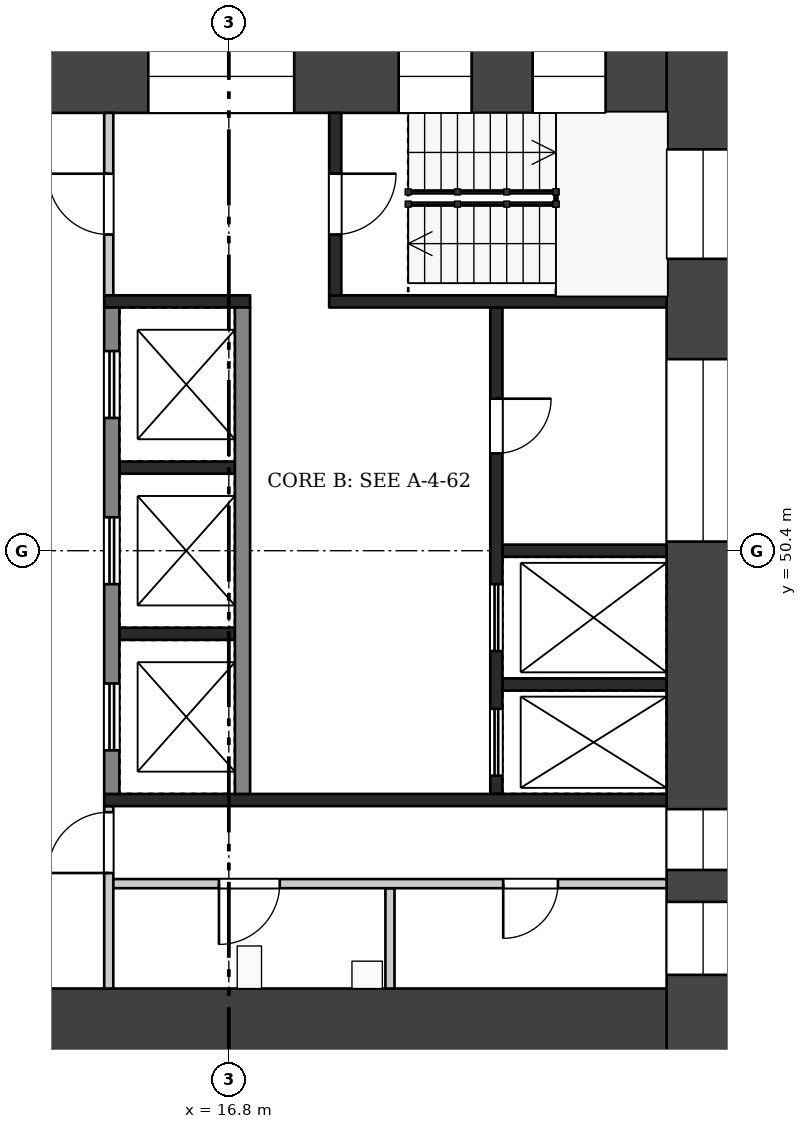
"""IFC4 building model, lengths in metres.
Left out: names, types, materials, properties, quantities, classifications, styles, units other than length and angle.
Written with IfcOpenShell. Run it as: python <this file> out.ifc"""

import sys

from ifc_helpers import new_model, si_unit, direction, frame, frame_2d, origin, place, context, subcontext, project, spatial, rectangle, extrude, element, fill, save


model = new_model("IFC4")
c1 = context("Model", 3, precision=1e-05, world=origin(), true_north=direction((0.0, 1.0)))
c2 = subcontext(c1, "Body", "Model", "MODEL_VIEW")
j1 = project(units=[si_unit("LENGTHUNIT", "METRE"), si_unit("PLANEANGLEUNIT", "RADIAN")], contexts=[c1])
p1 = place(None, origin())
s1 = spatial("IfcSite", under=j1, at=p1, CompositionType="ELEMENT")
p2 = place(p1, origin())
s2 = spatial("IfcBuilding", under=s1, at=p2, CompositionType="ELEMENT")
p3 = place(p2, frame((0.0, 0.0, 179.2)))
s3 = spatial("IfcBuildingStorey", under=s2, at=p3, CompositionType="ELEMENT", Elevation=179.2)
p4 = place(p3, frame((24.6, 58.8, 0.0), z_axis=(0.0, 0.0, 1.0), x_axis=(0.0, -1.0, 0.0)))
e1 = element("IfcWall", 1, at=p4, inside=s3, PredefinedType="SHEAR", context=c2, shape_type="SweptSolid", body=[
    extrude(rectangle(XDim=16.8, YDim=1.2, at=frame_2d((8.4, 0.0))), origin(), (0.0, 0.0, 1.0), 3.22),
])
p5 = place(p4, frame((1.8, 0.0, 0.5)))
e2 = element("IfcOpeningElement", 2, at=p5, cuts=e1, PredefinedType="OPENING", context=c2, shape_type="SweptSolid", body=[
    extrude(rectangle(XDim=1.8, YDim=2.4, at=frame_2d((0.9, 1.2))), frame((0.0, 0.61, 0.0), z_axis=(0.0, -1.0, 0.0), x_axis=(1.0, 0.0, 0.0)), (0.0, 0.0, 1.0), 1.22),
])
p6 = place(p4, frame((5.25, 0.0, 1.6)))
e3 = element("IfcOpeningElement", 3, at=p6, cuts=e1, PredefinedType="OPENING", context=c2, shape_type="SweptSolid", body=[
    extrude(rectangle(XDim=3.0, YDim=1.2, at=frame_2d((1.5, 0.6))), frame((0.0, 0.61, 0.0), z_axis=(0.0, -1.0, 0.0), x_axis=(1.0, 0.0, 0.0)), (0.0, 0.0, 1.0), 1.22),
])
p7 = place(p4, frame((12.65, 0.0, 0.6)))
e4 = element("IfcOpeningElement", 4, at=p7, cuts=e1, PredefinedType="OPENING", context=c2, shape_type="SweptSolid", body=[
    extrude(rectangle(XDim=1.0, YDim=2.1, at=frame_2d((0.5, 1.05))), frame((0.0, 0.61, 0.0), z_axis=(0.0, -1.0, 0.0), x_axis=(1.0, 0.0, 0.0)), (0.0, 0.0, 1.0), 1.22),
])
p8 = place(p4, frame((14.175, 0.0, 1.6)))
e5 = element("IfcOpeningElement", 5, at=p8, cuts=e1, PredefinedType="OPENING", context=c2, shape_type="SweptSolid", body=[
    extrude(rectangle(XDim=1.2, YDim=1.2, at=frame_2d((0.6, 0.6))), frame((0.0, 0.61, 0.0), z_axis=(0.0, -1.0, 0.0), x_axis=(1.0, 0.0, 0.0)), (0.0, 0.0, 1.0), 1.22),
])
p9 = place(p3, frame((9.6, 58.2, 0.0), z_axis=(0.0, 0.0, 1.0), x_axis=(1.0, 0.0, 0.0)))
e6 = element("IfcWall", 6, at=p9, inside=s3, PredefinedType="SHEAR", context=c2, shape_type="SweptSolid", body=[
    extrude(rectangle(XDim=14.4, YDim=1.2, at=frame_2d((7.2, 0.0))), origin(), (0.0, 0.0, 1.0), 3.22),
])
p10 = place(p9, frame((1.105, 0.0, 0.6)))
e7 = element("IfcOpeningElement", 7, at=p10, cuts=e6, PredefinedType="OPENING", context=c2, shape_type="SweptSolid", body=[
    extrude(rectangle(XDim=3.0, YDim=2.1, at=frame_2d((1.5, 1.05))), frame((0.0, 0.61, 0.0), z_axis=(0.0, -1.0, 0.0), x_axis=(1.0, 0.0, 0.0)), (0.0, 0.0, 1.0), 1.22),
])
p11 = place(p9, frame((5.875, 0.0, 0.6)))
e8 = element("IfcOpeningElement", 8, at=p11, cuts=e6, PredefinedType="OPENING", context=c2, shape_type="SweptSolid", body=[
    extrude(rectangle(XDim=2.4, YDim=2.1, at=frame_2d((1.2, 1.05))), frame((0.0, 0.61, 0.0), z_axis=(0.0, -1.0, 0.0), x_axis=(1.0, 0.0, 0.0)), (0.0, 0.0, 1.0), 1.22),
])
p12 = place(p9, frame((9.993, 0.0, 0.5)))
e9 = element("IfcOpeningElement", 9, at=p12, cuts=e6, PredefinedType="OPENING", context=c2, shape_type="SweptSolid", body=[
    extrude(rectangle(XDim=1.2, YDim=2.4, at=frame_2d((0.6, 1.2))), frame((0.0, 0.61, 0.0), z_axis=(0.0, -1.0, 0.0), x_axis=(1.0, 0.0, 0.0)), (0.0, 0.0, 1.0), 1.22),
])
p13 = place(p9, frame((12.197, 0.0, 0.5)))
e10 = element("IfcOpeningElement", 10, at=p13, cuts=e6, PredefinedType="OPENING", context=c2, shape_type="SweptSolid", body=[
    extrude(rectangle(XDim=1.2, YDim=2.4, at=frame_2d((0.6, 1.2))), frame((0.0, 0.61, 0.0), z_axis=(0.0, -1.0, 0.0), x_axis=(1.0, 0.0, 0.0)), (0.0, 0.0, 1.0), 1.22),
])
p14 = place(p3, frame((9.6, 42.6, 0.0), z_axis=(0.0, 0.0, 1.0), x_axis=(1.0, 0.0, 0.0)))
e11 = element("IfcWall", 11, at=p14, inside=s3, PredefinedType="SHEAR", context=c2, shape_type="SweptSolid", body=[
    extrude(rectangle(XDim=14.4, YDim=1.2, at=frame_2d((7.2, 0.0))), origin(), (0.0, 0.0, 1.0), 3.22),
])
p15 = place(p14, frame((2.1, 0.0, 0.0)))
e12 = element("IfcOpeningElement", 12, at=p15, cuts=e11, PredefinedType="OPENING", context=c2, shape_type="SweptSolid", body=[
    extrude(rectangle(XDim=1.8, YDim=2.1, at=frame_2d((0.9, 1.05))), frame((0.0, 0.61, 0.0), z_axis=(0.0, -1.0, 0.0), x_axis=(1.0, 0.0, 0.0)), (0.0, 0.0, 1.0), 1.22),
])
for number, where, z_axis, x_axis in (
    (13, (15.0, 51.767, 0.0), (0.0, 0.0, 1.0), (1.0, 0.0, 0.0)),
    (14, (15.0, 49.033, 0.0), (0.0, 0.0, 1.0), (1.0, 0.0, 0.0)),
):
    element("IfcWall", number, at=place(p3, frame(where, z_axis=z_axis, x_axis=x_axis)), inside=s3, PredefinedType="SHEAR", context=c2, shape_type="SweptSolid", body=[
        extrude(rectangle(XDim=1.9, YDim=0.2, at=frame_2d((0.95, 0.0))), origin(), (0.0, 0.0, 1.0), 3.22),
    ])
p16 = place(p3, frame((14.875, 54.4, 0.0), z_axis=(0.0, 0.0, 1.0), x_axis=(0.0, -1.0, 0.0)))
e15 = element("IfcWall", 15, at=p16, inside=s3, PredefinedType="SHEAR", context=c2, shape_type="SweptSolid", body=[
    extrude(rectangle(XDim=8.0, YDim=0.25, at=frame_2d((4.0, 0.0))), origin(), (0.0, 0.0, 1.0), 3.22),
])
p17 = place(p16, frame((0.717, 0.0, 0.0)))
e16 = element("IfcOpeningElement", 16, at=p17, cuts=e15, PredefinedType="OPENING", context=c2, shape_type="SweptSolid", body=[
    extrude(rectangle(XDim=1.1, YDim=2.1, at=frame_2d((0.55, 1.05))), frame((0.0, 0.135, 0.0), z_axis=(0.0, -1.0, 0.0), x_axis=(1.0, 0.0, 0.0)), (0.0, 0.0, 1.0), 0.27),
])
p18 = place(p16, frame((3.45, 0.0, 0.0)))
e17 = element("IfcOpeningElement", 17, at=p18, cuts=e15, PredefinedType="OPENING", context=c2, shape_type="SweptSolid", body=[
    extrude(rectangle(XDim=1.1, YDim=2.1, at=frame_2d((0.55, 1.05))), frame((0.0, 0.135, 0.0), z_axis=(0.0, -1.0, 0.0), x_axis=(1.0, 0.0, 0.0)), (0.0, 0.0, 1.0), 0.27),
])
p19 = place(p16, frame((6.183, 0.0, 0.0)))
e18 = element("IfcOpeningElement", 18, at=p19, cuts=e15, PredefinedType="OPENING", context=c2, shape_type="SweptSolid", body=[
    extrude(rectangle(XDim=1.1, YDim=2.1, at=frame_2d((0.55, 1.05))), frame((0.0, 0.135, 0.0), z_axis=(0.0, -1.0, 0.0), x_axis=(1.0, 0.0, 0.0)), (0.0, 0.0, 1.0), 0.27),
])
p20 = place(p3, frame((17.025, 54.4, 0.0), z_axis=(0.0, 0.0, 1.0), x_axis=(0.0, -1.0, 0.0)))
e19 = element("IfcWall", 19, at=p20, inside=s3, PredefinedType="SHEAR", context=c2, shape_type="SweptSolid", body=[
    extrude(rectangle(XDim=8.0, YDim=0.25, at=frame_2d((4.0, 0.0))), origin(), (0.0, 0.0, 1.0), 3.22),
])
for number, where, z_axis, x_axis in (
    (20, (21.3, 50.4, 0.0), (0.0, 0.0, 1.0), (1.0, 0.0, 0.0)),
    (21, (21.3, 48.2, 0.0), (0.0, 0.0, 1.0), (1.0, 0.0, 0.0)),
):
    element("IfcWall", number, at=place(p3, frame(where, z_axis=z_axis, x_axis=x_axis)), inside=s3, PredefinedType="SHEAR", context=c2, shape_type="SweptSolid", body=[
        extrude(rectangle(XDim=2.7, YDim=0.2, at=frame_2d((1.35, 0.0))), origin(), (0.0, 0.0, 1.0), 3.22),
    ])
p21 = place(p3, frame((21.2, 54.4, 0.0), z_axis=(0.0, 0.0, 1.0), x_axis=(0.0, -1.0, 0.0)))
e22 = element("IfcWall", 22, at=p21, inside=s3, PredefinedType="SHEAR", context=c2, shape_type="SweptSolid", body=[
    extrude(rectangle(XDim=8.0, YDim=0.2, at=frame_2d((4.0, 0.0))), origin(), (0.0, 0.0, 1.0), 3.22),
])
p22 = place(p21, frame((1.5, 0.0, 0.0)))
e23 = element("IfcOpeningElement", 23, at=p22, cuts=e22, PredefinedType="OPENING", context=c2, shape_type="SweptSolid", body=[
    extrude(rectangle(XDim=0.9, YDim=2.1, at=frame_2d((0.45, 1.05))), frame((0.0, 0.11, 0.0), z_axis=(0.0, -1.0, 0.0), x_axis=(1.0, 0.0, 0.0)), (0.0, 0.0, 1.0), 0.22),
])
p23 = place(p21, frame((4.55, 0.0, 0.0)))
e24 = element("IfcOpeningElement", 24, at=p23, cuts=e22, PredefinedType="OPENING", context=c2, shape_type="SweptSolid", body=[
    extrude(rectangle(XDim=1.1, YDim=2.1, at=frame_2d((0.55, 1.05))), frame((0.0, 0.11, 0.0), z_axis=(0.0, -1.0, 0.0), x_axis=(1.0, 0.0, 0.0)), (0.0, 0.0, 1.0), 0.22),
])
p24 = place(p21, frame((6.6, 0.0, 0.0)))
e25 = element("IfcOpeningElement", 25, at=p24, cuts=e22, PredefinedType="OPENING", context=c2, shape_type="SweptSolid", body=[
    extrude(rectangle(XDim=1.1, YDim=2.1, at=frame_2d((0.55, 1.05))), frame((0.0, 0.11, 0.0), z_axis=(0.0, -1.0, 0.0), x_axis=(1.0, 0.0, 0.0)), (0.0, 0.0, 1.0), 0.22),
])
p25 = place(p3, frame((14.75, 54.5, 0.0), z_axis=(0.0, 0.0, 1.0), x_axis=(1.0, 0.0, 0.0)))
e26 = element("IfcWall", 26, at=p25, inside=s3, PredefinedType="SHEAR", context=c2, shape_type="SweptSolid", body=[
    extrude(rectangle(XDim=2.4, YDim=0.2, at=frame_2d((1.2, 0.0))), origin(), (0.0, 0.0, 1.0), 3.22),
])
p26 = place(p3, frame((18.45, 54.5, 0.0), z_axis=(0.0, 0.0, 1.0), x_axis=(1.0, 0.0, 0.0)))
e27 = element("IfcWall", 27, at=p26, inside=s3, PredefinedType="SHEAR", context=c2, shape_type="SweptSolid", body=[
    extrude(rectangle(XDim=5.55, YDim=0.2, at=frame_2d((2.775, 0.0))), origin(), (0.0, 0.0, 1.0), 3.22),
])
p27 = place(p3, frame((14.825, 57.6, 0.0), z_axis=(0.0, 0.0, 1.0), x_axis=(0.0, -1.0, 0.0)))
e28 = element("IfcWall", 28, at=p27, inside=s3, PredefinedType="PARTITIONING", context=c2, shape_type="SweptSolid", body=[
    extrude(rectangle(XDim=3.0, YDim=0.15, at=frame_2d((1.5, 0.0))), origin(), (0.0, 0.0, 1.0), 3.22),
])
p28 = place(p27, frame((1.0, 0.0, 0.0)))
e29 = element("IfcOpeningElement", 29, at=p28, cuts=e28, PredefinedType="OPENING", context=c2, shape_type="SweptSolid", body=[
    extrude(rectangle(XDim=1.0, YDim=2.1, at=frame_2d((0.5, 1.05))), frame((0.0, 0.085, 0.0), z_axis=(0.0, -1.0, 0.0), x_axis=(1.0, 0.0, 0.0)), (0.0, 0.0, 1.0), 0.17),
])
p29 = place(p3, frame((18.55, 57.6, 0.0), z_axis=(0.0, 0.0, 1.0), x_axis=(0.0, -1.0, 0.0)))
e30 = element("IfcWall", 30, at=p29, inside=s3, PredefinedType="SHEAR", context=c2, shape_type="SweptSolid", body=[
    extrude(rectangle(XDim=3.0, YDim=0.2, at=frame_2d((1.5, 0.0))), origin(), (0.0, 0.0, 1.0), 3.22),
])
p30 = place(p29, frame((1.0, 0.0, 0.0)))
e31 = element("IfcOpeningElement", 31, at=p30, cuts=e30, PredefinedType="OPENING", context=c2, shape_type="SweptSolid", body=[
    extrude(rectangle(XDim=1.0, YDim=2.1, at=frame_2d((0.5, 1.05))), frame((0.0, 0.11, 0.0), z_axis=(0.0, -1.0, 0.0), x_axis=(1.0, 0.0, 0.0)), (0.0, 0.0, 1.0), 0.22),
])
p31 = place(p3, frame((14.75, 46.3, 0.0), z_axis=(0.0, 0.0, 1.0), x_axis=(1.0, 0.0, 0.0)))
e32 = element("IfcWall", 32, at=p31, inside=s3, PredefinedType="SHEAR", context=c2, shape_type="SweptSolid", body=[
    extrude(rectangle(XDim=9.25, YDim=0.2, at=frame_2d((4.625, 0.0))), origin(), (0.0, 0.0, 1.0), 3.22),
])
p32 = place(p3, frame((14.825, 46.2, 0.0), z_axis=(0.0, 0.0, 1.0), x_axis=(0.0, -1.0, 0.0)))
e33 = element("IfcWall", 33, at=p32, inside=s3, PredefinedType="PARTITIONING", context=c2, shape_type="SweptSolid", body=[
    extrude(rectangle(XDim=3.0, YDim=0.15, at=frame_2d((1.5, 0.0))), origin(), (0.0, 0.0, 1.0), 3.22),
])
p33 = place(p32, frame((0.1, 0.0, 0.0)))
e34 = element("IfcOpeningElement", 34, at=p33, cuts=e33, PredefinedType="OPENING", context=c2, shape_type="SweptSolid", body=[
    extrude(rectangle(XDim=1.0, YDim=2.1, at=frame_2d((0.5, 1.05))), frame((0.0, 0.085, 0.0), z_axis=(0.0, -1.0, 0.0), x_axis=(1.0, 0.0, 0.0)), (0.0, 0.0, 1.0), 0.17),
])
p34 = place(p3, frame((19.45, 44.85, 0.0), z_axis=(0.0, 0.0, 1.0), x_axis=(0.0, -1.0, 0.0)))
e35 = element("IfcWall", 35, at=p34, inside=s3, PredefinedType="PARTITIONING", context=c2, shape_type="SweptSolid", body=[
    extrude(rectangle(XDim=1.65, YDim=0.15, at=frame_2d((0.825, 0.0))), origin(), (0.0, 0.0, 1.0), 3.22),
])
p35 = place(p3, frame((14.9, 44.925, 0.0), z_axis=(0.0, 0.0, 1.0), x_axis=(1.0, 0.0, 0.0)))
e36 = element("IfcWall", 36, at=p35, inside=s3, PredefinedType="PARTITIONING", context=c2, shape_type="SweptSolid", body=[
    extrude(rectangle(XDim=9.1, YDim=0.15, at=frame_2d((4.55, 0.0))), origin(), (0.0, 0.0, 1.0), 3.22),
])
p36 = place(p35, frame((1.738, 0.0, 0.0)))
e37 = element("IfcOpeningElement", 37, at=p36, cuts=e36, PredefinedType="OPENING", context=c2, shape_type="SweptSolid", body=[
    extrude(rectangle(XDim=1.0, YDim=2.1, at=frame_2d((0.5, 1.05))), frame((0.0, 0.085, 0.0), z_axis=(0.0, -1.0, 0.0), x_axis=(1.0, 0.0, 0.0)), (0.0, 0.0, 1.0), 0.17),
])
p37 = place(p35, frame((6.413, 0.0, 0.0)))
e38 = element("IfcOpeningElement", 38, at=p37, cuts=e36, PredefinedType="OPENING", context=c2, shape_type="SweptSolid", body=[
    extrude(rectangle(XDim=0.9, YDim=2.1, at=frame_2d((0.45, 1.05))), frame((0.0, 0.085, 0.0), z_axis=(0.0, -1.0, 0.0), x_axis=(1.0, 0.0, 0.0)), (0.0, 0.0, 1.0), 0.17),
])
p38 = place(p17, origin())
e39 = element("IfcDoor", 39, at=p38, inside=s3, OperationType="DOUBLE_DOOR_SLIDING", PredefinedType="DOOR", context=c2, shape_type="SweptSolid", body=[
    extrude(rectangle(XDim=1.1, YDim=2.1, at=frame_2d((0.55, 1.05))), frame((0.0, 0.025, 0.0), z_axis=(0.0, -1.0, 0.0), x_axis=(1.0, 0.0, 0.0)), (0.0, 0.0, 1.0), 0.05),
])
fill(e16, e39)
p39 = place(p18, origin())
e40 = element("IfcDoor", 40, at=p39, inside=s3, OperationType="DOUBLE_DOOR_SLIDING", PredefinedType="DOOR", context=c2, shape_type="SweptSolid", body=[
    extrude(rectangle(XDim=1.1, YDim=2.1, at=frame_2d((0.55, 1.05))), frame((0.0, 0.025, 0.0), z_axis=(0.0, -1.0, 0.0), x_axis=(1.0, 0.0, 0.0)), (0.0, 0.0, 1.0), 0.05),
])
fill(e17, e40)
p40 = place(p19, origin())
e41 = element("IfcDoor", 41, at=p40, inside=s3, OperationType="DOUBLE_DOOR_SLIDING", PredefinedType="DOOR", context=c2, shape_type="SweptSolid", body=[
    extrude(rectangle(XDim=1.1, YDim=2.1, at=frame_2d((0.55, 1.05))), frame((0.0, 0.025, 0.0), z_axis=(0.0, -1.0, 0.0), x_axis=(1.0, 0.0, 0.0)), (0.0, 0.0, 1.0), 0.05),
])
fill(e18, e41)
p41 = place(p22, origin())
e42 = element("IfcDoor", 42, at=p41, inside=s3, OperationType="SINGLE_SWING_LEFT", PredefinedType="DOOR", context=c2, shape_type="SweptSolid", body=[
    extrude(rectangle(XDim=0.9, YDim=2.1, at=frame_2d((0.45, 1.05))), frame((0.0, 0.025, 0.0), z_axis=(0.0, -1.0, 0.0), x_axis=(1.0, 0.0, 0.0)), (0.0, 0.0, 1.0), 0.05),
])
fill(e23, e42)
p42 = place(p23, origin())
e43 = element("IfcDoor", 43, at=p42, inside=s3, OperationType="DOUBLE_DOOR_SLIDING", PredefinedType="DOOR", context=c2, shape_type="SweptSolid", body=[
    extrude(rectangle(XDim=1.1, YDim=2.1, at=frame_2d((0.55, 1.05))), frame((0.0, 0.025, 0.0), z_axis=(0.0, -1.0, 0.0), x_axis=(1.0, 0.0, 0.0)), (0.0, 0.0, 1.0), 0.05),
])
fill(e24, e43)
p43 = place(p24, origin())
e44 = element("IfcDoor", 44, at=p43, inside=s3, OperationType="DOUBLE_DOOR_SLIDING", PredefinedType="DOOR", context=c2, shape_type="SweptSolid", body=[
    extrude(rectangle(XDim=1.1, YDim=2.1, at=frame_2d((0.55, 1.05))), frame((0.0, 0.025, 0.0), z_axis=(0.0, -1.0, 0.0), x_axis=(1.0, 0.0, 0.0)), (0.0, 0.0, 1.0), 0.05),
])
fill(e25, e44)
p44 = place(p28, frame((1.0, 0.0, 0.0), z_axis=(0.0, 0.0, 1.0), x_axis=(-1.0, 0.0, 0.0)))
e45 = element("IfcDoor", 45, at=p44, inside=s3, OperationType="SINGLE_SWING_RIGHT", PredefinedType="DOOR", context=c2, shape_type="SweptSolid", body=[
    extrude(rectangle(XDim=1.0, YDim=2.1, at=frame_2d((0.5, 1.05))), frame((0.0, 0.025, 0.0), z_axis=(0.0, -1.0, 0.0), x_axis=(1.0, 0.0, 0.0)), (0.0, 0.0, 1.0), 0.05),
])
fill(e29, e45)
p45 = place(p30, origin())
e46 = element("IfcDoor", 46, at=p45, inside=s3, OperationType="SINGLE_SWING_LEFT", PredefinedType="DOOR", context=c2, shape_type="SweptSolid", body=[
    extrude(rectangle(XDim=1.0, YDim=2.1, at=frame_2d((0.5, 1.05))), frame((0.0, 0.025, 0.0), z_axis=(0.0, -1.0, 0.0), x_axis=(1.0, 0.0, 0.0)), (0.0, 0.0, 1.0), 0.05),
])
fill(e31, e46)
p46 = place(p33, frame((1.0, 0.0, 0.0), z_axis=(0.0, 0.0, 1.0), x_axis=(-1.0, 0.0, 0.0)))
e47 = element("IfcDoor", 47, at=p46, inside=s3, OperationType="SINGLE_SWING_LEFT", PredefinedType="DOOR", context=c2, shape_type="SweptSolid", body=[
    extrude(rectangle(XDim=1.0, YDim=2.1, at=frame_2d((0.5, 1.05))), frame((0.0, 0.025, 0.0), z_axis=(0.0, -1.0, 0.0), x_axis=(1.0, 0.0, 0.0)), (0.0, 0.0, 1.0), 0.05),
])
fill(e34, e47)
p47 = place(p36, frame((1.0, 0.0, 0.0), z_axis=(0.0, 0.0, 1.0), x_axis=(-1.0, 0.0, 0.0)))
e48 = element("IfcDoor", 48, at=p47, inside=s3, OperationType="SINGLE_SWING_RIGHT", PredefinedType="DOOR", context=c2, shape_type="SweptSolid", body=[
    extrude(rectangle(XDim=1.0, YDim=2.1, at=frame_2d((0.5, 1.05))), frame((0.0, 0.025, 0.0), z_axis=(0.0, -1.0, 0.0), x_axis=(1.0, 0.0, 0.0)), (0.0, 0.0, 1.0), 0.05),
])
fill(e37, e48)
p48 = place(p37, frame((0.9, 0.0, 0.0), z_axis=(0.0, 0.0, 1.0), x_axis=(-1.0, 0.0, 0.0)))
e49 = element("IfcDoor", 49, at=p48, inside=s3, OperationType="SINGLE_SWING_RIGHT", PredefinedType="DOOR", context=c2, shape_type="SweptSolid", body=[
    extrude(rectangle(XDim=0.9, YDim=2.1, at=frame_2d((0.45, 1.05))), frame((0.0, 0.025, 0.0), z_axis=(0.0, -1.0, 0.0), x_axis=(1.0, 0.0, 0.0)), (0.0, 0.0, 1.0), 0.05),
])
fill(e38, e49)
p49 = place(p5, origin())
e50 = element("IfcWindow", 50, at=p49, inside=s3, PartitioningType="SINGLE_PANEL", PredefinedType="WINDOW", context=c2, shape_type="SweptSolid", body=[
    extrude(rectangle(XDim=1.8, YDim=2.4, at=frame_2d((0.9, 1.2))), frame((0.0, 0.03, 0.0), z_axis=(0.0, -1.0, 0.0), x_axis=(1.0, 0.0, 0.0)), (0.0, 0.0, 1.0), 0.06),
])
fill(e2, e50)
p50 = place(p6, origin())
e51 = element("IfcWindow", 51, at=p50, inside=s3, PartitioningType="SINGLE_PANEL", PredefinedType="WINDOW", context=c2, shape_type="SweptSolid", body=[
    extrude(rectangle(XDim=3.0, YDim=1.2, at=frame_2d((1.5, 0.6))), frame((0.0, 0.03, 0.0), z_axis=(0.0, -1.0, 0.0), x_axis=(1.0, 0.0, 0.0)), (0.0, 0.0, 1.0), 0.06),
])
fill(e3, e51)
p51 = place(p7, origin())
e52 = element("IfcWindow", 52, at=p51, inside=s3, PartitioningType="SINGLE_PANEL", PredefinedType="WINDOW", context=c2, shape_type="SweptSolid", body=[
    extrude(rectangle(XDim=1.0, YDim=2.1, at=frame_2d((0.5, 1.05))), frame((0.0, 0.03, 0.0), z_axis=(0.0, -1.0, 0.0), x_axis=(1.0, 0.0, 0.0)), (0.0, 0.0, 1.0), 0.06),
])
fill(e4, e52)
p52 = place(p8, origin())
e53 = element("IfcWindow", 53, at=p52, inside=s3, PartitioningType="SINGLE_PANEL", PredefinedType="WINDOW", context=c2, shape_type="SweptSolid", body=[
    extrude(rectangle(XDim=1.2, YDim=1.2, at=frame_2d((0.6, 0.6))), frame((0.0, 0.03, 0.0), z_axis=(0.0, -1.0, 0.0), x_axis=(1.0, 0.0, 0.0)), (0.0, 0.0, 1.0), 0.06),
])
fill(e5, e53)
p53 = place(p11, origin())
e54 = element("IfcWindow", 54, at=p53, inside=s3, PartitioningType="SINGLE_PANEL", PredefinedType="WINDOW", context=c2, shape_type="SweptSolid", body=[
    extrude(rectangle(XDim=2.4, YDim=2.1, at=frame_2d((1.2, 1.05))), frame((0.0, 0.03, 0.0), z_axis=(0.0, -1.0, 0.0), x_axis=(1.0, 0.0, 0.0)), (0.0, 0.0, 1.0), 0.06),
])
fill(e8, e54)
p54 = place(p12, origin())
e55 = element("IfcWindow", 55, at=p54, inside=s3, PartitioningType="SINGLE_PANEL", PredefinedType="WINDOW", context=c2, shape_type="SweptSolid", body=[
    extrude(rectangle(XDim=1.2, YDim=2.4, at=frame_2d((0.6, 1.2))), frame((0.0, 0.03, 0.0), z_axis=(0.0, -1.0, 0.0), x_axis=(1.0, 0.0, 0.0)), (0.0, 0.0, 1.0), 0.06),
])
fill(e9, e55)
p55 = place(p13, origin())
e56 = element("IfcWindow", 56, at=p55, inside=s3, PartitioningType="SINGLE_PANEL", PredefinedType="WINDOW", context=c2, shape_type="SweptSolid", body=[
    extrude(rectangle(XDim=1.2, YDim=2.4, at=frame_2d((0.6, 1.2))), frame((0.0, 0.03, 0.0), z_axis=(0.0, -1.0, 0.0), x_axis=(1.0, 0.0, 0.0)), (0.0, 0.0, 1.0), 0.06),
])
fill(e10, e56)
save(model, sys.argv[1])
